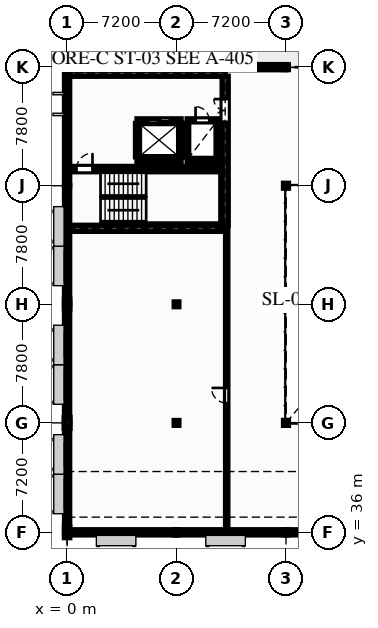
"""IFC4 building model, lengths in metres.
Left out: names, types, materials, properties, quantities, classifications, styles, units other than length and angle.
Written with IfcOpenShell. Run it as: python <this file> out.ifc"""

import sys

from ifc_helpers import new_model, si_unit, direction, frame, frame_2d, origin, origin_2d, place, context, subcontext, project, spatial, rectangle, hollow_circle, i_section, extrude, element, fill, save


model = new_model("IFC4")
c1 = context("Model", 3, precision=1e-05, world=origin(), true_north=direction((0.0, 1.0)))
c2 = subcontext(c1, "Body", "Model", "MODEL_VIEW")
j1 = project(units=[si_unit("LENGTHUNIT", "METRE"), si_unit("PLANEANGLEUNIT", "RADIAN")], contexts=[c1])
p1 = place(None, origin())
s1 = spatial("IfcSite", under=j1, at=p1, CompositionType="ELEMENT")
p2 = place(p1, origin())
s2 = spatial("IfcBuilding", under=s1, at=p2, CompositionType="ELEMENT")
p3 = place(p2, frame((0.0, 0.0, 12.78)))
s3 = spatial("IfcBuildingStorey", under=s2, at=p3, CompositionType="ELEMENT", Elevation=12.78)
p4 = place(p3, frame((0.0, 36.0, 0.0), z_axis=(0.0, 0.0, 1.0), x_axis=(1.0, 0.0, 0.0)))
e1 = element("IfcColumn", 1, at=p4, inside=s3, PredefinedType="PILASTER", context=c2, shape_type="SweptSolid", body=[
    extrude(rectangle(XDim=0.35, YDim=0.7, at=origin_2d()), origin(), (0.0, 0.0, 1.0), 3.74),
])
p5 = place(p3, frame((0.0, 43.2, 0.0), z_axis=(0.0, 0.0, 1.0), x_axis=(1.0, 0.0, 0.0)))
e2 = element("IfcColumn", 2, at=p5, inside=s3, PredefinedType="PILASTER", context=c2, shape_type="SweptSolid", body=[
    extrude(rectangle(XDim=0.38, YDim=0.72, at=origin_2d()), origin(), (0.0, 0.0, 1.0), 3.74),
])
p6 = place(p3, frame((0.0, 51.0, 0.0), z_axis=(0.0, 0.0, 1.0), x_axis=(1.0, 0.0, 0.0)))
e3 = element("IfcColumn", 3, at=p6, inside=s3, PredefinedType="PILASTER", context=c2, shape_type="SweptSolid", body=[
    extrude(rectangle(XDim=0.35, YDim=0.7, at=origin_2d()), origin(), (0.0, 0.0, 1.0), 3.74),
])
for number, where, z_axis, x_axis in (
    (4, (7.2, 36.0, 0.0), (0.0, 0.0, 1.0), (1.0, 0.0, 0.0)),
    (5, (7.2, 43.2, 0.0), (0.0, 0.0, 1.0), (1.0, 0.0, 0.0)),
    (6, (7.2, 51.0, 0.0), (0.0, 0.0, 1.0), (1.0, 0.0, 0.0)),
    (7, (14.4, 36.0, 0.0), (0.0, 0.0, 1.0), (1.0, 0.0, 0.0)),
):
    element("IfcColumn", number, at=place(p3, frame(where, z_axis=z_axis, x_axis=x_axis)), inside=s3, PredefinedType="COLUMN", context=c2, shape_type="SweptSolid", body=[
        extrude(i_section(OverallWidth=0.307, OverallDepth=0.315, WebThickness=0.012, FlangeThickness=0.019, at=origin_2d()), origin(), (0.0, 0.0, 1.0), 3.74),
    ])
for number, where, z_axis, x_axis in (
    (8, (14.4, 43.2, 0.0), (0.0, 0.0, 1.0), (1.0, 0.0, 0.0)),
    (9, (14.4, 51.0, 0.0), (0.0, 0.0, 1.0), (1.0, 0.0, 0.0)),
    (10, (14.4, 58.8, 0.0), (0.0, 0.0, 1.0), (1.0, 0.0, 0.0)),
):
    element("IfcColumn", number, at=place(p3, frame(where, z_axis=z_axis, x_axis=x_axis)), inside=s3, PredefinedType="COLUMN", context=c2, shape_type="SweptSolid", body=[
        extrude(hollow_circle(Radius=0.162, WallThickness=0.012, at=origin_2d()), origin(), (0.0, 0.0, 1.0), 3.74),
    ])
p7 = place(p3, frame((14.4, 66.6, 0.0), z_axis=(0.0, 0.0, 1.0), x_axis=(1.0, 0.0, 0.0)))
e11 = element("IfcColumn", 11, at=p7, inside=s3, PredefinedType="COLUMN", context=c2, shape_type="SweptSolid", body=[
    extrude(i_section(OverallWidth=0.307, OverallDepth=0.315, WebThickness=0.012, FlangeThickness=0.019, at=origin_2d()), origin(), (0.0, 0.0, 1.0), 3.74),
])
p8 = place(p3, frame((0.0, 36.0, 0.0), z_axis=(0.0, 0.0, 1.0), x_axis=(0.0, 1.0, 0.0)))
e12 = element("IfcWall", 12, at=p8, inside=s3, PredefinedType="SOLIDWALL", context=c2, shape_type="SweptSolid", body=[
    extrude(rectangle(XDim=7.2, YDim=0.34, at=frame_2d((3.6, 0.0))), origin(), (0.0, 0.0, 1.0), 3.42),
])
p9 = place(p8, frame((1.5, 0.0, 0.85)))
e13 = element("IfcOpeningElement", 13, at=p9, cuts=e12, PredefinedType="OPENING", context=c2, shape_type="SweptSolid", body=[
    extrude(rectangle(XDim=2.05, YDim=1.85, at=frame_2d((1.025, 0.925))), frame((0.0, 0.18, 0.0), z_axis=(0.0, -1.0, 0.0), x_axis=(1.0, 0.0, 0.0)), (0.0, 0.0, 1.0), 0.36),
])
p10 = place(p8, frame((4.3, 0.0, 0.698)))
e14 = element("IfcOpeningElement", 14, at=p10, cuts=e12, PredefinedType="OPENING", context=c2, shape_type="SweptSolid", body=[
    extrude(rectangle(XDim=1.65, YDim=2.25, at=frame_2d((0.825, 1.125))), frame((0.0, 0.18, 0.0), z_axis=(0.0, -1.0, 0.0), x_axis=(1.0, 0.0, 0.0)), (0.0, 0.0, 1.0), 0.36),
])
p11 = place(p3, frame((0.0, 43.2, 0.0), z_axis=(0.0, 0.0, 1.0), x_axis=(0.0, 1.0, 0.0)))
e15 = element("IfcWall", 15, at=p11, inside=s3, PredefinedType="SOLIDWALL", context=c2, shape_type="SweptSolid", body=[
    extrude(rectangle(XDim=7.8, YDim=0.34, at=frame_2d((3.9, 0.0))), origin(), (0.0, 0.0, 1.0), 3.42),
])
p12 = place(p11, frame((1.5, 0.0, 0.85)))
e16 = element("IfcOpeningElement", 16, at=p12, cuts=e15, PredefinedType="OPENING", context=c2, shape_type="SweptSolid", body=[
    extrude(rectangle(XDim=2.05, YDim=1.85, at=frame_2d((1.025, 0.925))), frame((0.0, 0.18, 0.0), z_axis=(0.0, -1.0, 0.0), x_axis=(1.0, 0.0, 0.0)), (0.0, 0.0, 1.0), 0.36),
])
p13 = place(p11, frame((4.3, 0.0, 0.698)))
e17 = element("IfcOpeningElement", 17, at=p13, cuts=e15, PredefinedType="OPENING", context=c2, shape_type="SweptSolid", body=[
    extrude(rectangle(XDim=1.65, YDim=2.25, at=frame_2d((0.825, 1.125))), frame((0.0, 0.18, 0.0), z_axis=(0.0, -1.0, 0.0), x_axis=(1.0, 0.0, 0.0)), (0.0, 0.0, 1.0), 0.36),
])
p14 = place(p3, frame((0.0, 51.0, 0.0), z_axis=(0.0, 0.0, 1.0), x_axis=(0.0, 1.0, 0.0)))
e18 = element("IfcWall", 18, at=p14, inside=s3, PredefinedType="SOLIDWALL", context=c2, shape_type="SweptSolid", body=[
    extrude(rectangle(XDim=7.8, YDim=0.34, at=frame_2d((3.9, 0.0))), origin(), (0.0, 0.0, 1.0), 3.42),
])
p15 = place(p14, frame((1.5, 0.0, 0.85)))
e19 = element("IfcOpeningElement", 19, at=p15, cuts=e18, PredefinedType="OPENING", context=c2, shape_type="SweptSolid", body=[
    extrude(rectangle(XDim=2.05, YDim=1.85, at=frame_2d((1.025, 0.925))), frame((0.0, 0.18, 0.0), z_axis=(0.0, -1.0, 0.0), x_axis=(1.0, 0.0, 0.0)), (0.0, 0.0, 1.0), 0.36),
])
p16 = place(p3, frame((0.0, 58.8, 0.0), z_axis=(0.0, 0.0, 1.0), x_axis=(0.0, 1.0, 0.0)))
e20 = element("IfcWall", 20, at=p16, inside=s3, PredefinedType="SOLIDWALL", context=c2, shape_type="SweptSolid", body=[
    extrude(rectangle(XDim=7.8, YDim=0.34, at=frame_2d((3.9, 0.0))), origin(), (0.0, 0.0, 1.0), 3.42),
])
p17 = place(p16, frame((4.85, 0.0, 1.1)))
e21 = element("IfcOpeningElement", 21, at=p17, cuts=e20, PredefinedType="OPENING", context=c2, shape_type="SweptSolid", body=[
    extrude(rectangle(XDim=1.05, YDim=1.75, at=frame_2d((0.525, 0.875))), frame((0.0, 0.18, 0.0), z_axis=(0.0, -1.0, 0.0), x_axis=(1.0, 0.0, 0.0)), (0.0, 0.0, 1.0), 0.36),
])
p18 = place(p3, frame((0.0, 66.6, 0.0), z_axis=(0.0, 0.0, 1.0), x_axis=(1.0, 0.0, 0.0)))
e22 = element("IfcWall", 22, at=p18, inside=s3, PredefinedType="SOLIDWALL", context=c2, shape_type="SweptSolid", body=[
    extrude(rectangle(XDim=7.2, YDim=0.34, at=frame_2d((3.6, 0.0))), origin(), (0.0, 0.0, 1.0), 3.42),
])
p19 = place(p18, frame((2.2, 0.0, 0.9)))
e23 = element("IfcOpeningElement", 23, at=p19, cuts=e22, PredefinedType="OPENING", context=c2, shape_type="SweptSolid", body=[
    extrude(rectangle(XDim=1.75, YDim=2.15, at=frame_2d((0.875, 1.075))), frame((0.0, 0.18, 0.0), z_axis=(0.0, -1.0, 0.0), x_axis=(1.0, 0.0, 0.0)), (0.0, 0.0, 1.0), 0.36),
])
p20 = place(p3, frame((0.0, 36.0, 0.0), z_axis=(0.0, 0.0, 1.0), x_axis=(1.0, 0.0, 0.0)))
e24 = element("IfcWall", 24, at=p20, inside=s3, PredefinedType="SOLIDWALL", context=c2, shape_type="SweptSolid", body=[
    extrude(rectangle(XDim=7.2, YDim=0.34, at=frame_2d((3.6, 0.0))), origin(), (0.0, 0.0, 1.0), 3.42),
])
p21 = place(p20, frame((2.2, 0.0, 0.9)))
e25 = element("IfcOpeningElement", 25, at=p21, cuts=e24, PredefinedType="OPENING", context=c2, shape_type="SweptSolid", body=[
    extrude(rectangle(XDim=2.05, YDim=1.85, at=frame_2d((1.025, 0.925))), frame((0.0, 0.18, 0.0), z_axis=(0.0, -1.0, 0.0), x_axis=(1.0, 0.0, 0.0)), (0.0, 0.0, 1.0), 0.36),
])
p22 = place(p3, frame((7.2, 66.6, 0.0), z_axis=(0.0, 0.0, 1.0), x_axis=(1.0, 0.0, 0.0)))
e26 = element("IfcWall", 26, at=p22, inside=s3, PredefinedType="SOLIDWALL", context=c2, shape_type="SweptSolid", body=[
    extrude(rectangle(XDim=7.2, YDim=0.34, at=frame_2d((3.6, 0.0))), origin(), (0.0, 0.0, 1.0), 3.42),
])
p23 = place(p22, frame((4.4, 0.0, 0.9)))
e27 = element("IfcOpeningElement", 27, at=p23, cuts=e26, PredefinedType="OPENING", context=c2, shape_type="SweptSolid", body=[
    extrude(rectangle(XDim=1.75, YDim=2.15, at=frame_2d((0.875, 1.075))), frame((0.0, 0.18, 0.0), z_axis=(0.0, -1.0, 0.0), x_axis=(1.0, 0.0, 0.0)), (0.0, 0.0, 1.0), 0.36),
])
p24 = place(p3, frame((7.2, 36.0, 0.0), z_axis=(0.0, 0.0, 1.0), x_axis=(1.0, 0.0, 0.0)))
e28 = element("IfcWall", 28, at=p24, inside=s3, PredefinedType="SOLIDWALL", context=c2, shape_type="SweptSolid", body=[
    extrude(rectangle(XDim=7.2, YDim=0.34, at=frame_2d((3.6, 0.0))), origin(), (0.0, 0.0, 1.0), 3.42),
])
p25 = place(p24, frame((4.4, 0.0, 0.9)))
e29 = element("IfcOpeningElement", 29, at=p25, cuts=e28, PredefinedType="OPENING", context=c2, shape_type="SweptSolid", body=[
    extrude(rectangle(XDim=2.05, YDim=1.85, at=frame_2d((1.025, 0.925))), frame((0.0, 0.18, 0.0), z_axis=(0.0, -1.0, 0.0), x_axis=(1.0, 0.0, 0.0)), (0.0, 0.0, 1.0), 0.36),
])
p26 = place(p3, frame((14.4, 36.0, 0.0), z_axis=(0.0, 0.0, 1.0), x_axis=(1.0, 0.0, 0.0)))
e30 = element("IfcWall", 30, at=p26, inside=s3, PredefinedType="SOLIDWALL", context=c2, shape_type="SweptSolid", body=[
    extrude(rectangle(XDim=7.2, YDim=0.34, at=frame_2d((3.6, 0.0))), origin(), (0.0, 0.0, 1.0), 3.42),
])
p27 = place(p26, frame((2.2, 0.0, 0.9)))
e31 = element("IfcOpeningElement", 31, at=p27, cuts=e30, PredefinedType="OPENING", context=c2, shape_type="SweptSolid", body=[
    extrude(rectangle(XDim=2.05, YDim=1.85, at=frame_2d((1.025, 0.925))), frame((0.0, 0.18, 0.0), z_axis=(0.0, -1.0, 0.0), x_axis=(1.0, 0.0, 0.0)), (0.0, 0.0, 1.0), 0.36),
])
p28 = place(p3, frame((0.0, 74.2, 0.0), z_axis=(0.0, 0.0, 1.0), x_axis=(0.0, -1.0, 0.0)))
e32 = element("IfcWall", 32, at=p28, inside=s3, PredefinedType="PARAPET", context=c2, shape_type="SweptSolid", body=[
    extrude(rectangle(XDim=7.4, YDim=0.2, at=frame_2d((3.7, 0.0))), origin(), (0.0, 0.0, 1.0), 0.72),
])
for number, where, z_axis, x_axis in (
    (33, (0.17, 56.0, 0.0), (0.0, 0.0, 1.0), (1.0, 0.0, 0.0)),
    (34, (0.17, 66.2, 0.0), (0.0, 0.0, 1.0), (1.0, 0.0, 0.0)),
):
    element("IfcWall", number, at=place(p3, frame(where, z_axis=z_axis, x_axis=x_axis)), inside=s3, PredefinedType="SHEAR", context=c2, shape_type="SweptSolid", body=[
        extrude(rectangle(XDim=10.23, YDim=0.4, at=frame_2d((5.115, 0.0))), origin(), (0.0, 0.0, 1.0), 3.42),
    ])
p29 = place(p3, frame((10.4, 56.2, 0.0), z_axis=(0.0, 0.0, 1.0), x_axis=(0.0, 1.0, 0.0)))
e35 = element("IfcWall", 35, at=p29, inside=s3, PredefinedType="SHEAR", context=c2, shape_type="SweptSolid", body=[
    extrude(rectangle(XDim=9.8, YDim=0.4, at=frame_2d((4.9, 0.0))), origin(), (0.0, 0.0, 1.0), 3.42),
])
p30 = place(p29, frame((6.8, 0.0, 0.0)))
e36 = element("IfcOpeningElement", 36, at=p30, cuts=e35, PredefinedType="OPENING", context=c2, shape_type="SweptSolid", body=[
    extrude(rectangle(XDim=1.5, YDim=2.2, at=frame_2d((0.75, 1.1))), frame((0.0, 0.21, 0.0), z_axis=(0.0, -1.0, 0.0), x_axis=(1.0, 0.0, 0.0)), (0.0, 0.0, 1.0), 0.42),
])
p31 = place(p3, frame((0.17, 59.895, 0.0), z_axis=(0.0, 0.0, 1.0), x_axis=(1.0, 0.0, 0.0)))
e37 = element("IfcWall", 37, at=p31, inside=s3, PredefinedType="SHEAR", context=c2, shape_type="SweptSolid", body=[
    extrude(rectangle(XDim=10.03, YDim=0.35, at=frame_2d((5.015, 0.0))), origin(), (0.0, 0.0, 1.0), 3.42),
])
p32 = place(p31, frame((0.45, 0.0, 0.0)))
e38 = element("IfcOpeningElement", 38, at=p32, cuts=e37, PredefinedType="OPENING", context=c2, shape_type="SweptSolid", body=[
    extrude(rectangle(XDim=1.05, YDim=2.2, at=frame_2d((0.525, 1.1))), frame((0.0, 0.185, 0.0), z_axis=(0.0, -1.0, 0.0), x_axis=(1.0, 0.0, 0.0)), (0.0, 0.0, 1.0), 0.37),
])
p33 = place(p3, frame((4.6, 60.5, 0.0), z_axis=(0.0, 0.0, 1.0), x_axis=(1.0, 0.0, 0.0)))
e39 = element("IfcWall", 39, at=p33, inside=s3, PredefinedType="PARTITIONING", context=c2, shape_type="SweptSolid", body=[
    extrude(rectangle(XDim=2.9, YDim=0.2, at=frame_2d((1.45, 0.0))), origin(), (0.0, 0.0, 1.0), 3.42),
])
p34 = place(p3, frame((4.6, 63.1, 0.0), z_axis=(0.0, 0.0, 1.0), x_axis=(1.0, 0.0, 0.0)))
e40 = element("IfcWall", 40, at=p34, inside=s3, PredefinedType="PARTITIONING", context=c2, shape_type="SweptSolid", body=[
    extrude(rectangle(XDim=2.9, YDim=0.2, at=frame_2d((1.45, 0.0))), origin(), (0.0, 0.0, 1.0), 3.42),
])
p35 = place(p34, frame((0.75, 0.0, 0.0)))
e41 = element("IfcOpeningElement", 41, at=p35, cuts=e40, PredefinedType="OPENING", context=c2, shape_type="SweptSolid", body=[
    extrude(rectangle(XDim=1.4, YDim=2.25, at=frame_2d((0.7, 1.125))), frame((0.0, 0.11, 0.0), z_axis=(0.0, -1.0, 0.0), x_axis=(1.0, 0.0, 0.0)), (0.0, 0.0, 1.0), 0.22),
])
for number, where, z_axis, x_axis in (
    (42, (4.6, 60.7, 0.0), (0.0, 0.0, 1.0), (0.0, 1.0, 0.0)),
    (43, (7.5, 60.7, 0.0), (0.0, 0.0, 1.0), (0.0, 1.0, 0.0)),
):
    element("IfcWall", number, at=place(p3, frame(where, z_axis=z_axis, x_axis=x_axis)), inside=s3, PredefinedType="PARTITIONING", context=c2, shape_type="SweptSolid", body=[
        extrude(rectangle(XDim=2.2, YDim=0.2, at=frame_2d((1.1, 0.0))), origin(), (0.0, 0.0, 1.0), 3.42),
    ])
p36 = place(p3, frame((7.9, 60.5, 0.0), z_axis=(0.0, 0.0, 1.0), x_axis=(1.0, 0.0, 0.0)))
e44 = element("IfcWall", 44, at=p36, inside=s3, PredefinedType="PARTITIONING", context=c2, shape_type="SweptSolid", body=[
    extrude(rectangle(XDim=2.0, YDim=0.2, at=frame_2d((1.0, 0.0))), origin(), (0.0, 0.0, 1.0), 3.42),
])
p37 = place(p3, frame((7.9, 63.1, 0.0), z_axis=(0.0, 0.0, 1.0), x_axis=(1.0, 0.0, 0.0)))
e45 = element("IfcWall", 45, at=p37, inside=s3, PredefinedType="PARTITIONING", context=c2, shape_type="SweptSolid", body=[
    extrude(rectangle(XDim=2.0, YDim=0.2, at=frame_2d((1.0, 0.0))), origin(), (0.0, 0.0, 1.0), 3.42),
])
p38 = place(p37, frame((0.55, 0.0, 0.0)))
e46 = element("IfcOpeningElement", 46, at=p38, cuts=e45, PredefinedType="OPENING", context=c2, shape_type="SweptSolid", body=[
    extrude(rectangle(XDim=0.9, YDim=2.1, at=frame_2d((0.45, 1.05))), frame((0.0, 0.11, 0.0), z_axis=(0.0, -1.0, 0.0), x_axis=(1.0, 0.0, 0.0)), (0.0, 0.0, 1.0), 0.22),
])
for number, where, z_axis, x_axis in (
    (47, (7.9, 60.7, 0.0), (0.0, 0.0, 1.0), (0.0, 1.0, 0.0)),
    (48, (9.9, 60.7, 0.0), (0.0, 0.0, 1.0), (0.0, 1.0, 0.0)),
):
    element("IfcWall", number, at=place(p3, frame(where, z_axis=z_axis, x_axis=x_axis)), inside=s3, PredefinedType="PARTITIONING", context=c2, shape_type="SweptSolid", body=[
        extrude(rectangle(XDim=2.2, YDim=0.2, at=frame_2d((1.1, 0.0))), origin(), (0.0, 0.0, 1.0), 3.42),
    ])
p39 = place(p3, frame((10.5, 36.0, 0.0), z_axis=(0.0, 0.0, 1.0), x_axis=(0.0, 1.0, 0.0)))
e49 = element("IfcWall", 49, at=p39, inside=s3, PredefinedType="PARTITIONING", context=c2, shape_type="SweptSolid", body=[
    extrude(rectangle(XDim=20.0, YDim=0.15, at=frame_2d((10.0, 0.0))), origin(), (0.0, 0.0, 1.0), 3.42),
])
p40 = place(p39, frame((8.5, 0.0, 0.0)))
e50 = element("IfcOpeningElement", 50, at=p40, cuts=e49, PredefinedType="OPENING", context=c2, shape_type="SweptSolid", body=[
    extrude(rectangle(XDim=1.0, YDim=2.15, at=frame_2d((0.5, 1.075))), frame((0.0, 0.085, 0.0), z_axis=(0.0, -1.0, 0.0), x_axis=(1.0, 0.0, 0.0)), (0.0, 0.0, 1.0), 0.17),
])
p41 = place(p9, origin())
e51 = element("IfcWindow", 51, at=p41, inside=s3, PartitioningType="SINGLE_PANEL", PredefinedType="WINDOW", context=c2, shape_type="SweptSolid", body=[
    extrude(rectangle(XDim=2.05, YDim=1.85, at=frame_2d((1.025, 0.925))), frame((0.0, 0.03, 0.0), z_axis=(0.0, -1.0, 0.0), x_axis=(1.0, 0.0, 0.0)), (0.0, 0.0, 1.0), 0.06),
])
fill(e13, e51)
p42 = place(p10, origin())
e52 = element("IfcWindow", 52, at=p42, inside=s3, PartitioningType="SINGLE_PANEL", PredefinedType="WINDOW", context=c2, shape_type="SweptSolid", body=[
    extrude(rectangle(XDim=1.65, YDim=2.25, at=frame_2d((0.825, 1.125))), frame((0.0, 0.03, 0.0), z_axis=(0.0, -1.0, 0.0), x_axis=(1.0, 0.0, 0.0)), (0.0, 0.0, 1.0), 0.06),
])
fill(e14, e52)
p43 = place(p12, origin())
e53 = element("IfcWindow", 53, at=p43, inside=s3, PartitioningType="SINGLE_PANEL", PredefinedType="WINDOW", context=c2, shape_type="SweptSolid", body=[
    extrude(rectangle(XDim=2.05, YDim=1.85, at=frame_2d((1.025, 0.925))), frame((0.0, 0.03, 0.0), z_axis=(0.0, -1.0, 0.0), x_axis=(1.0, 0.0, 0.0)), (0.0, 0.0, 1.0), 0.06),
])
fill(e16, e53)
p44 = place(p13, origin())
e54 = element("IfcWindow", 54, at=p44, inside=s3, PartitioningType="SINGLE_PANEL", PredefinedType="WINDOW", context=c2, shape_type="SweptSolid", body=[
    extrude(rectangle(XDim=1.65, YDim=2.25, at=frame_2d((0.825, 1.125))), frame((0.0, 0.03, 0.0), z_axis=(0.0, -1.0, 0.0), x_axis=(1.0, 0.0, 0.0)), (0.0, 0.0, 1.0), 0.06),
])
fill(e17, e54)
p45 = place(p15, origin())
e55 = element("IfcWindow", 55, at=p45, inside=s3, PartitioningType="SINGLE_PANEL", PredefinedType="WINDOW", context=c2, shape_type="SweptSolid", body=[
    extrude(rectangle(XDim=2.05, YDim=1.85, at=frame_2d((1.025, 0.925))), frame((0.0, 0.03, 0.0), z_axis=(0.0, -1.0, 0.0), x_axis=(1.0, 0.0, 0.0)), (0.0, 0.0, 1.0), 0.06),
])
fill(e19, e55)
p46 = place(p17, origin())
e56 = element("IfcWindow", 56, at=p46, inside=s3, PartitioningType="SINGLE_PANEL", PredefinedType="WINDOW", context=c2, shape_type="SweptSolid", body=[
    extrude(rectangle(XDim=1.05, YDim=1.75, at=frame_2d((0.525, 0.875))), frame((0.0, 0.03, 0.0), z_axis=(0.0, -1.0, 0.0), x_axis=(1.0, 0.0, 0.0)), (0.0, 0.0, 1.0), 0.06),
])
fill(e21, e56)
p47 = place(p19, origin())
e57 = element("IfcWindow", 57, at=p47, inside=s3, PartitioningType="SINGLE_PANEL", PredefinedType="WINDOW", context=c2, shape_type="SweptSolid", body=[
    extrude(rectangle(XDim=1.75, YDim=2.15, at=frame_2d((0.875, 1.075))), frame((0.0, 0.03, 0.0), z_axis=(0.0, -1.0, 0.0), x_axis=(1.0, 0.0, 0.0)), (0.0, 0.0, 1.0), 0.06),
])
fill(e23, e57)
p48 = place(p21, origin())
e58 = element("IfcWindow", 58, at=p48, inside=s3, PartitioningType="SINGLE_PANEL", PredefinedType="WINDOW", context=c2, shape_type="SweptSolid", body=[
    extrude(rectangle(XDim=2.05, YDim=1.85, at=frame_2d((1.025, 0.925))), frame((0.0, 0.03, 0.0), z_axis=(0.0, -1.0, 0.0), x_axis=(1.0, 0.0, 0.0)), (0.0, 0.0, 1.0), 0.06),
])
fill(e25, e58)
p49 = place(p23, origin())
e59 = element("IfcWindow", 59, at=p49, inside=s3, PartitioningType="SINGLE_PANEL", PredefinedType="WINDOW", context=c2, shape_type="SweptSolid", body=[
    extrude(rectangle(XDim=1.75, YDim=2.15, at=frame_2d((0.875, 1.075))), frame((0.0, 0.03, 0.0), z_axis=(0.0, -1.0, 0.0), x_axis=(1.0, 0.0, 0.0)), (0.0, 0.0, 1.0), 0.06),
])
fill(e27, e59)
p50 = place(p25, origin())
e60 = element("IfcWindow", 60, at=p50, inside=s3, PartitioningType="SINGLE_PANEL", PredefinedType="WINDOW", context=c2, shape_type="SweptSolid", body=[
    extrude(rectangle(XDim=2.05, YDim=1.85, at=frame_2d((1.025, 0.925))), frame((0.0, 0.03, 0.0), z_axis=(0.0, -1.0, 0.0), x_axis=(1.0, 0.0, 0.0)), (0.0, 0.0, 1.0), 0.06),
])
fill(e29, e60)
p51 = place(p30, origin())
e61 = element("IfcDoor", 61, at=p51, inside=s3, OperationType="DOUBLE_DOOR_SINGLE_SWING", PredefinedType="DOOR", context=c2, shape_type="SweptSolid", body=[
    extrude(rectangle(XDim=1.5, YDim=2.2, at=frame_2d((0.75, 1.1))), frame((0.0, 0.025, 0.0), z_axis=(0.0, -1.0, 0.0), x_axis=(1.0, 0.0, 0.0)), (0.0, 0.0, 1.0), 0.05),
])
fill(e36, e61)
p52 = place(p32, origin())
e62 = element("IfcDoor", 62, at=p52, inside=s3, OperationType="SINGLE_SWING_RIGHT", PredefinedType="DOOR", context=c2, shape_type="SweptSolid", body=[
    extrude(rectangle(XDim=1.05, YDim=2.2, at=frame_2d((0.525, 1.1))), frame((0.0, 0.025, 0.0), z_axis=(0.0, -1.0, 0.0), x_axis=(1.0, 0.0, 0.0)), (0.0, 0.0, 1.0), 0.05),
])
fill(e38, e62)
p53 = place(p35, origin())
e63 = element("IfcDoor", 63, at=p53, inside=s3, OperationType="SLIDING_TO_LEFT", PredefinedType="DOOR", context=c2, shape_type="SweptSolid", body=[
    extrude(rectangle(XDim=1.4, YDim=2.25, at=frame_2d((0.7, 1.125))), frame((0.0, 0.025, 0.0), z_axis=(0.0, -1.0, 0.0), x_axis=(1.0, 0.0, 0.0)), (0.0, 0.0, 1.0), 0.05),
])
fill(e41, e63)
p54 = place(p38, origin())
e64 = element("IfcDoor", 64, at=p54, inside=s3, OperationType="SINGLE_SWING_LEFT", PredefinedType="DOOR", context=c2, shape_type="SweptSolid", body=[
    extrude(rectangle(XDim=0.9, YDim=2.1, at=frame_2d((0.45, 1.05))), frame((0.0, 0.025, 0.0), z_axis=(0.0, -1.0, 0.0), x_axis=(1.0, 0.0, 0.0)), (0.0, 0.0, 1.0), 0.05),
])
fill(e46, e64)
p55 = place(p40, origin())
e65 = element("IfcDoor", 65, at=p55, inside=s3, OperationType="SINGLE_SWING_RIGHT", PredefinedType="DOOR", context=c2, shape_type="SweptSolid", body=[
    extrude(rectangle(XDim=1.0, YDim=2.15, at=frame_2d((0.5, 1.075))), frame((0.0, 0.025, 0.0), z_axis=(0.0, -1.0, 0.0), x_axis=(1.0, 0.0, 0.0)), (0.0, 0.0, 1.0), 0.05),
])
fill(e50, e65)
save(model, sys.argv[1])
